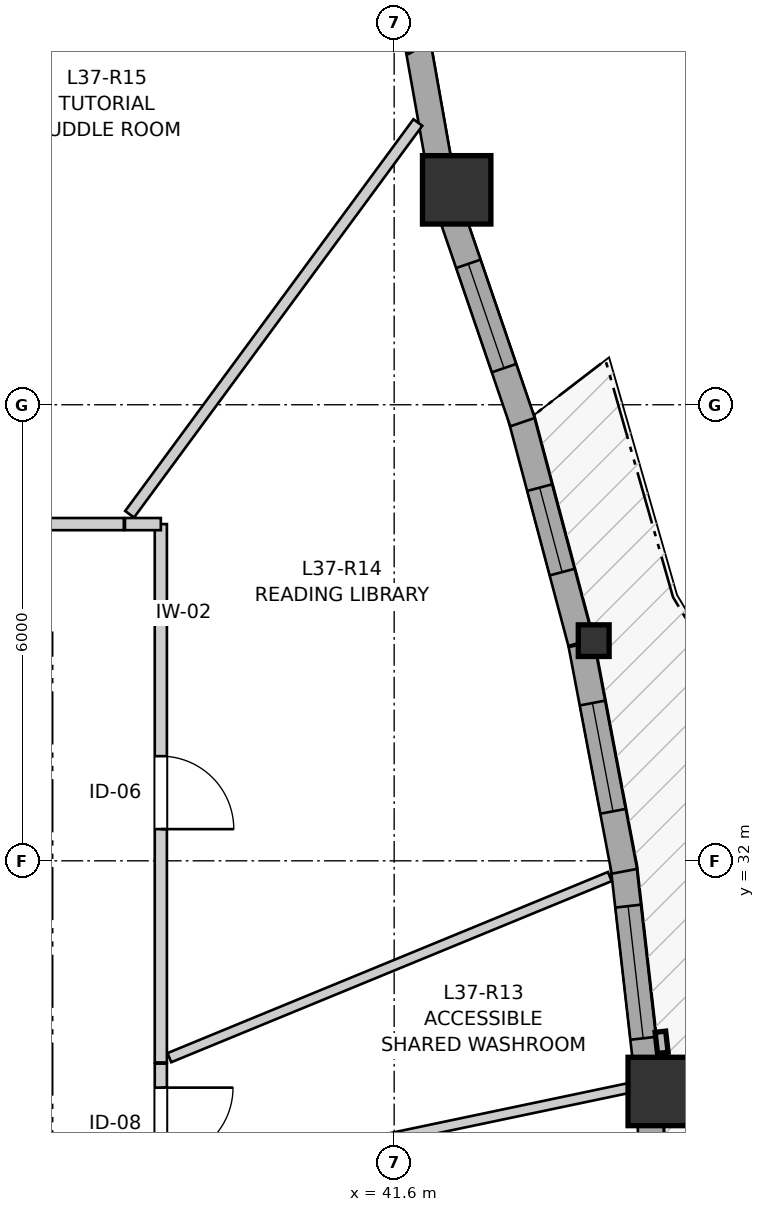
"""IFC4 building model, lengths in metres.
Left out: names, types, materials, properties, quantities, classifications, styles, units other than length and angle.
Written with IfcOpenShell. Run it as: python <this file> out.ifc"""

import sys

from ifc_helpers import new_model, si_unit, direction, frame, frame_2d, origin, origin_2d, place, context, subcontext, project, spatial, rectangle, i_section, extrude, source, transform, mapped, element, fill, save


model = new_model("IFC4")
c1 = context("Model", 3, precision=1e-05, world=origin(), true_north=direction((0.0, 1.0)))
c2 = subcontext(c1, "Body", "Model", "MODEL_VIEW")
j1 = project(units=[si_unit("LENGTHUNIT", "METRE"), si_unit("PLANEANGLEUNIT", "RADIAN")], contexts=[c1])
p1 = place(None, origin())
s1 = spatial("IfcSite", under=j1, at=p1, CompositionType="ELEMENT")
p2 = place(p1, origin())
s2 = spatial("IfcBuilding", under=s1, at=p2, CompositionType="ELEMENT")
p3 = place(p2, frame((0.0, 0.0, 124.8)))
s3 = spatial("IfcBuildingStorey", under=s2, at=p3, CompositionType="ELEMENT", Elevation=124.8)
m1 = source(origin(), c2, "Body", "SweptSolid", [
    extrude(rectangle(XDim=0.9, YDim=0.9, at=origin_2d()), origin(), (0.0, 0.0, 1.0), 2.9),
])
p4 = place(p3, frame((45.127, 28.966, 0.0), z_axis=(0.0, 0.0, 1.0), x_axis=(1.0, 0.0, 0.0)))
e1 = element("IfcColumn", 1, at=p4, inside=s3, PredefinedType="COLUMN", context=c2, shape_type="MappedRepresentation", body=[
    mapped(m1, transform((0.0, 0.0, 0.0), x_axis=(1.0, 0.0, 0.0), y_axis=(0.0, 1.0, 0.0), z_axis=(0.0, 0.0, 1.0), scale=1.0)),
])
m2 = source(origin(), c2, "Body", "SweptSolid", [
    extrude(i_section(OverallWidth=0.406, OverallDepth=0.416, WebThickness=0.027, FlangeThickness=0.044, FilletRadius=0.015, at=origin_2d()), origin(), (0.0, 0.0, 1.0), 2.9),
])
p5 = place(p3, frame((44.226, 34.896, 0.0), z_axis=(0.0, 0.0, 1.0), x_axis=(1.0, 0.0, 0.0)))
e2 = element("IfcColumn", 2, at=p5, inside=s3, PredefinedType="PILASTER", context=c2, shape_type="MappedRepresentation", body=[
    mapped(m2, transform((0.0, 0.0, 0.0), x_axis=(1.0, 0.0, 0.0), y_axis=(0.0, 1.0, 0.0), z_axis=(0.0, 0.0, 1.0), scale=1.0)),
])
p6 = place(p3, frame((42.423, 40.828, 0.0), z_axis=(0.0, 0.0, 1.0), x_axis=(1.0, 0.0, 0.0)))
e3 = element("IfcColumn", 3, at=p6, inside=s3, PredefinedType="COLUMN", context=c2, shape_type="MappedRepresentation", body=[
    mapped(m1, transform((0.0, 0.0, 0.0), x_axis=(1.0, 0.0, 0.0), y_axis=(0.0, 1.0, 0.0), z_axis=(0.0, 0.0, 1.0), scale=1.0)),
])
p7 = place(p3, frame((45.071, 25.956, 0.0), z_axis=(0.0, 0.0, 1.0), x_axis=(-0.037997361734, 0.999277839493, 0.0)))
e4 = element("IfcWall", 4, at=p7, inside=s3, PredefinedType="SOLIDWALL", context=c2, shape_type="SweptSolid", body=[
    extrude(rectangle(XDim=2.776, YDim=0.34, at=frame_2d((1.388, 0.0))), origin(), (0.0, 0.0, 1.0), 2.43),
])
p8 = place(p7, frame((0.771, 0.0, 0.82)))
e5 = element("IfcOpeningElement", 5, at=p8, cuts=e4, PredefinedType="OPENING", context=c2, shape_type="SweptSolid", body=[
    extrude(rectangle(XDim=1.45, YDim=1.25, at=frame_2d((0.725, 0.625))), frame((0.0, 0.18, 0.0), z_axis=(0.0, -1.0, 0.0), x_axis=(1.0, 0.0, 0.0)), (0.0, 0.0, 1.0), 0.36),
])
p9 = place(p3, frame((44.932, 29.175, 0.0), z_axis=(0.0, 0.0, 1.0), x_axis=(-0.113290188042, 0.993561942354, 0.0)))
e6 = element("IfcWall", 6, at=p9, inside=s3, PredefinedType="SOLIDWALL", context=c2, shape_type="SweptSolid", body=[
    extrude(rectangle(XDim=2.793, YDim=0.34, at=frame_2d((1.396, 0.0))), origin(), (0.0, 0.0, 1.0), 2.43),
])
p10 = place(p9, frame((0.493, 0.0, 0.82)))
e7 = element("IfcOpeningElement", 7, at=p10, cuts=e6, PredefinedType="OPENING", context=c2, shape_type="SweptSolid", body=[
    extrude(rectangle(XDim=1.75, YDim=1.3, at=frame_2d((0.875, 0.65))), frame((0.0, 0.18, 0.0), z_axis=(0.0, -1.0, 0.0), x_axis=(1.0, 0.0, 0.0)), (0.0, 0.0, 1.0), 0.36),
])
p11 = place(p3, frame((44.629, 31.862, 0.0), z_axis=(0.0, 0.0, 1.0), x_axis=(-0.186690909565, 0.982418701108, 0.0)))
e8 = element("IfcWall", 8, at=p11, inside=s3, PredefinedType="SOLIDWALL", context=c2, shape_type="SweptSolid", body=[
    extrude(rectangle(XDim=3.037, YDim=0.34, at=frame_2d((1.518, 0.0))), origin(), (0.0, 0.0, 1.0), 2.43),
])
p12 = place(p11, frame((0.803, 0.0, 0.82)))
e9 = element("IfcOpeningElement", 9, at=p12, cuts=e8, PredefinedType="OPENING", context=c2, shape_type="SweptSolid", body=[
    extrude(rectangle(XDim=1.45, YDim=1.25, at=frame_2d((0.725, 0.625))), frame((0.0, 0.18, 0.0), z_axis=(0.0, -1.0, 0.0), x_axis=(1.0, 0.0, 0.0)), (0.0, 0.0, 1.0), 0.36),
])
p13 = place(p3, frame((44.056, 34.872, 0.0), z_axis=(0.0, 0.0, 1.0), x_axis=(-0.257081647056, 0.966389686797, 0.0)))
e10 = element("IfcWall", 10, at=p13, inside=s3, PredefinedType="SOLIDWALL", context=c2, shape_type="SweptSolid", body=[
    extrude(rectangle(XDim=3.086, YDim=0.34, at=frame_2d((1.543, 0.0))), origin(), (0.0, 0.0, 1.0), 2.43),
])
p14 = place(p13, frame((0.958, 0.0, 0.82)))
e11 = element("IfcOpeningElement", 11, at=p14, cuts=e10, PredefinedType="OPENING", context=c2, shape_type="SweptSolid", body=[
    extrude(rectangle(XDim=1.15, YDim=1.2, at=frame_2d((0.575, 0.6))), frame((0.0, 0.18, 0.0), z_axis=(0.0, -1.0, 0.0), x_axis=(1.0, 0.0, 0.0)), (0.0, 0.0, 1.0), 0.36),
])
p15 = place(p3, frame((43.288, 37.771, 0.0), z_axis=(0.0, 0.0, 1.0), x_axis=(-0.323537149191, 0.94621546864, 0.0)))
e12 = element("IfcWall", 12, at=p15, inside=s3, PredefinedType="SOLIDWALL", context=c2, shape_type="SweptSolid", body=[
    extrude(rectangle(XDim=2.942, YDim=0.34, at=frame_2d((1.471, 0.0))), origin(), (0.0, 0.0, 1.0), 2.43),
])
p16 = place(p15, frame((0.751, 0.0, 0.82)))
e13 = element("IfcOpeningElement", 13, at=p16, cuts=e12, PredefinedType="OPENING", context=c2, shape_type="SweptSolid", body=[
    extrude(rectangle(XDim=1.45, YDim=1.25, at=frame_2d((0.725, 0.625))), frame((0.0, 0.18, 0.0), z_axis=(0.0, -1.0, 0.0), x_axis=(1.0, 0.0, 0.0)), (0.0, 0.0, 1.0), 0.36),
])
p17 = place(p3, frame((42.215, 41.024, 0.0), z_axis=(0.0, 0.0, 1.0), x_axis=(-0.17440141227, 0.984674640375, 0.0)))
e14 = element("IfcWall", 14, at=p17, inside=s3, PredefinedType="SOLIDWALL", context=c2, shape_type="SweptSolid", body=[
    extrude(rectangle(XDim=1.831, YDim=0.34, at=frame_2d((0.916, 0.0))), origin(), (0.0, 0.0, 1.0), 2.43),
])
p18 = place(p3, frame((41.942, 42.701, 0.0), z_axis=(0.0, 0.0, 1.0), x_axis=(-0.501902596059, 0.864924149315, 0.0)))
e15 = element("IfcWall", 15, at=p18, inside=s3, PredefinedType="SOLIDWALL", context=c2, shape_type="SweptSolid", body=[
    extrude(rectangle(XDim=2.099, YDim=0.34, at=frame_2d((1.049, 0.0))), origin(), (0.0, 0.0, 1.0), 2.43),
])
p19 = place(p18, frame((0.324, 0.0, 0.82)))
e16 = element("IfcOpeningElement", 16, at=p19, cuts=e15, PredefinedType="OPENING", context=c2, shape_type="SweptSolid", body=[
    extrude(rectangle(XDim=1.45, YDim=1.25, at=frame_2d((0.725, 0.625))), frame((0.0, 0.18, 0.0), z_axis=(0.0, -1.0, 0.0), x_axis=(1.0, 0.0, 0.0)), (0.0, 0.0, 1.0), 0.36),
])
p20 = place(p3, frame((38.53, 36.43, 0.0), z_axis=(0.0, 0.0, 1.0), x_axis=(0.0, -1.0, 0.0)))
e17 = element("IfcWall", 17, at=p20, inside=s3, PredefinedType="PARTITIONING", context=c2, shape_type="SweptSolid", body=[
    extrude(rectangle(XDim=7.083, YDim=0.16, at=frame_2d((3.542, 0.0))), origin(), (0.0, 0.0, 1.0), 2.538),
])
p21 = place(p20, frame((3.053, 0.0, 0.0)))
e18 = element("IfcOpeningElement", 18, at=p21, cuts=e17, PredefinedType="OPENING", context=c2, shape_type="SweptSolid", body=[
    extrude(rectangle(XDim=0.96, YDim=2.1, at=frame_2d((0.48, 1.05))), frame((0.0, 0.09, 0.0), z_axis=(0.0, -1.0, 0.0), x_axis=(1.0, 0.0, 0.0)), (0.0, 0.0, 1.0), 0.18),
])
p22 = place(p3, frame((32.925, 36.43, 0.0), z_axis=(0.0, 0.0, 1.0), x_axis=(1.0, 0.0, 0.0)))
e19 = element("IfcWall", 19, at=p22, inside=s3, PredefinedType="PARTITIONING", context=c2, shape_type="SweptSolid", body=[
    extrude(rectangle(XDim=5.118, YDim=0.16, at=frame_2d((2.559, 0.0))), origin(), (0.0, 0.0, 1.0), 2.538),
])
p23 = place(p22, frame((1.907, 0.0, 0.0)))
e20 = element("IfcOpeningElement", 20, at=p23, cuts=e19, PredefinedType="OPENING", context=c2, shape_type="SweptSolid", body=[
    extrude(rectangle(XDim=1.3, YDim=2.1, at=frame_2d((0.65, 1.05))), frame((0.0, 0.09, 0.0), z_axis=(0.0, -1.0, 0.0), x_axis=(1.0, 0.0, 0.0)), (0.0, 0.0, 1.0), 0.18),
])
p24 = place(p3, frame((38.53, 29.332, 0.0), z_axis=(0.0, 0.0, 1.0), x_axis=(0.0, -1.0, 0.0)))
e21 = element("IfcWall", 21, at=p24, inside=s3, PredefinedType="PARTITIONING", context=c2, shape_type="SweptSolid", body=[
    extrude(rectangle(XDim=1.629, YDim=0.16, at=frame_2d((0.814, 0.0))), origin(), (0.0, 0.0, 1.0), 2.9),
])
p25 = place(p24, frame((0.316, 0.0, 0.0)))
e22 = element("IfcOpeningElement", 22, at=p25, cuts=e21, PredefinedType="OPENING", context=c2, shape_type="SweptSolid", body=[
    extrude(rectangle(XDim=0.95, YDim=2.1, at=frame_2d((0.475, 1.05))), frame((0.0, 0.09, 0.0), z_axis=(0.0, -1.0, 0.0), x_axis=(1.0, 0.0, 0.0)), (0.0, 0.0, 1.0), 0.18),
])
p26 = place(p3, frame((38.119, 36.559, 0.0), z_axis=(0.0, 0.0, 1.0), x_axis=(0.592704345809, 0.805420113021, 0.0)))
e23 = element("IfcWall", 23, at=p26, inside=s3, PredefinedType="PARTITIONING", context=c2, shape_type="SweptSolid", body=[
    extrude(rectangle(XDim=6.399, YDim=0.145, at=frame_2d((3.199, 0.0))), origin(), (0.0, 0.0, 1.0), 2.9),
])
p27 = place(p3, frame((38.642, 29.41, 0.0), z_axis=(0.0, 0.0, 1.0), x_axis=(0.924865201518, 0.380295094659, 0.0)))
e24 = element("IfcWall", 24, at=p27, inside=s3, PredefinedType="PARTITIONING", context=c2, shape_type="SweptSolid", body=[
    extrude(rectangle(XDim=6.266, YDim=0.13, at=frame_2d((3.133, 0.0))), origin(), (0.0, 0.0, 1.0), 2.9),
])
p28 = place(p3, frame((38.631, 27.739, 0.0), z_axis=(0.0, 0.0, 1.0), x_axis=(0.978654667538, 0.205511658323, 0.0)))
e25 = element("IfcWall", 25, at=p28, inside=s3, PredefinedType="PARTITIONING", context=c2, shape_type="SweptSolid", body=[
    extrude(rectangle(XDim=6.29, YDim=0.13, at=frame_2d((3.145, 0.0))), origin(), (0.0, 0.0, 1.0), 2.318),
])
p29 = place(p3, frame((38.058, 36.43, 0.0), z_axis=(0.0, 0.0, 1.0), x_axis=(1.0, 0.0, 0.0)))
e26 = element("IfcWall", 26, at=p29, inside=s3, PredefinedType="PARTITIONING", context=c2, shape_type="SweptSolid", body=[
    extrude(rectangle(XDim=0.472, YDim=0.16, at=frame_2d((0.236, 0.0))), origin(), (0.0, 0.0, 1.0), 2.538),
])
m3 = source(origin(), c2, "Body", "SweptSolid", [
    extrude(rectangle(XDim=1.75, YDim=1.3, at=frame_2d((0.875, 0.65))), frame((0.0, 0.03, 0.0), z_axis=(0.0, -1.0, 0.0), x_axis=(1.0, 0.0, 0.0)), (0.0, 0.0, 1.0), 0.06),
])
p30 = place(p10, origin())
e27 = element("IfcWindow", 27, at=p30, inside=s3, PartitioningType="SINGLE_PANEL", PredefinedType="WINDOW", context=c2, shape_type="MappedRepresentation", body=[
    mapped(m3, transform((0.0, 0.0, 0.0), x_axis=(1.0, 0.0, 0.0), y_axis=(0.0, 1.0, 0.0), z_axis=(0.0, 0.0, 1.0), scale=1.0)),
])
fill(e7, e27)
m4 = source(origin(), c2, "Body", "SweptSolid", [
    extrude(rectangle(XDim=1.45, YDim=1.25, at=frame_2d((0.725, 0.625))), frame((0.0, 0.03, 0.0), z_axis=(0.0, -1.0, 0.0), x_axis=(1.0, 0.0, 0.0)), (0.0, 0.0, 1.0), 0.06),
])
p31 = place(p12, origin())
e28 = element("IfcWindow", 28, at=p31, inside=s3, PartitioningType="SINGLE_PANEL", PredefinedType="WINDOW", context=c2, shape_type="MappedRepresentation", body=[
    mapped(m4, transform((0.0, 0.0, 0.0), x_axis=(1.0, 0.0, 0.0), y_axis=(0.0, 1.0, 0.0), z_axis=(0.0, 0.0, 1.0), scale=1.0)),
])
fill(e9, e28)
m5 = source(origin(), c2, "Body", "SweptSolid", [
    extrude(rectangle(XDim=1.15, YDim=1.2, at=frame_2d((0.575, 0.6))), frame((0.0, 0.03, 0.0), z_axis=(0.0, -1.0, 0.0), x_axis=(1.0, 0.0, 0.0)), (0.0, 0.0, 1.0), 0.06),
])
p32 = place(p14, origin())
e29 = element("IfcWindow", 29, at=p32, inside=s3, PartitioningType="SINGLE_PANEL", PredefinedType="WINDOW", context=c2, shape_type="MappedRepresentation", body=[
    mapped(m5, transform((0.0, 0.0, 0.0), x_axis=(1.0, 0.0, 0.0), y_axis=(0.0, 1.0, 0.0), z_axis=(0.0, 0.0, 1.0), scale=1.0)),
])
fill(e11, e29)
p33 = place(p16, origin())
e30 = element("IfcWindow", 30, at=p33, inside=s3, PartitioningType="SINGLE_PANEL", PredefinedType="WINDOW", context=c2, shape_type="MappedRepresentation", body=[
    mapped(m4, transform((0.0, 0.0, 0.0), x_axis=(1.0, 0.0, 0.0), y_axis=(0.0, 1.0, 0.0), z_axis=(0.0, 0.0, 1.0), scale=1.0)),
])
fill(e13, e30)
m6 = source(origin(), c2, "Body", "SweptSolid", [
    extrude(rectangle(XDim=0.96, YDim=2.1, at=frame_2d((0.48, 1.05))), frame((0.0, 0.025, 0.0), z_axis=(0.0, -1.0, 0.0), x_axis=(1.0, 0.0, 0.0)), (0.0, 0.0, 1.0), 0.05),
])
p34 = place(p21, origin())
e31 = element("IfcDoor", 31, at=p34, inside=s3, OperationType="SINGLE_SWING_RIGHT", PredefinedType="DOOR", context=c2, shape_type="MappedRepresentation", body=[
    mapped(m6, transform((0.0, 0.0, 0.0), x_axis=(1.0, 0.0, 0.0), y_axis=(0.0, 1.0, 0.0), z_axis=(0.0, 0.0, 1.0), scale=1.0)),
])
fill(e18, e31)
m7 = source(origin(), c2, "Body", "SweptSolid", [
    extrude(rectangle(XDim=0.95, YDim=2.1, at=frame_2d((0.475, 1.05))), frame((0.0, 0.025, 0.0), z_axis=(0.0, -1.0, 0.0), x_axis=(1.0, 0.0, 0.0)), (0.0, 0.0, 1.0), 0.05),
])
p35 = place(p25, origin())
e32 = element("IfcDoor", 32, at=p35, inside=s3, OperationType="SINGLE_SWING_LEFT", PredefinedType="DOOR", context=c2, shape_type="MappedRepresentation", body=[
    mapped(m7, transform((0.0, 0.0, 0.0), x_axis=(1.0, 0.0, 0.0), y_axis=(0.0, 1.0, 0.0), z_axis=(0.0, 0.0, 1.0), scale=1.0)),
])
fill(e22, e32)
save(model, sys.argv[1])
